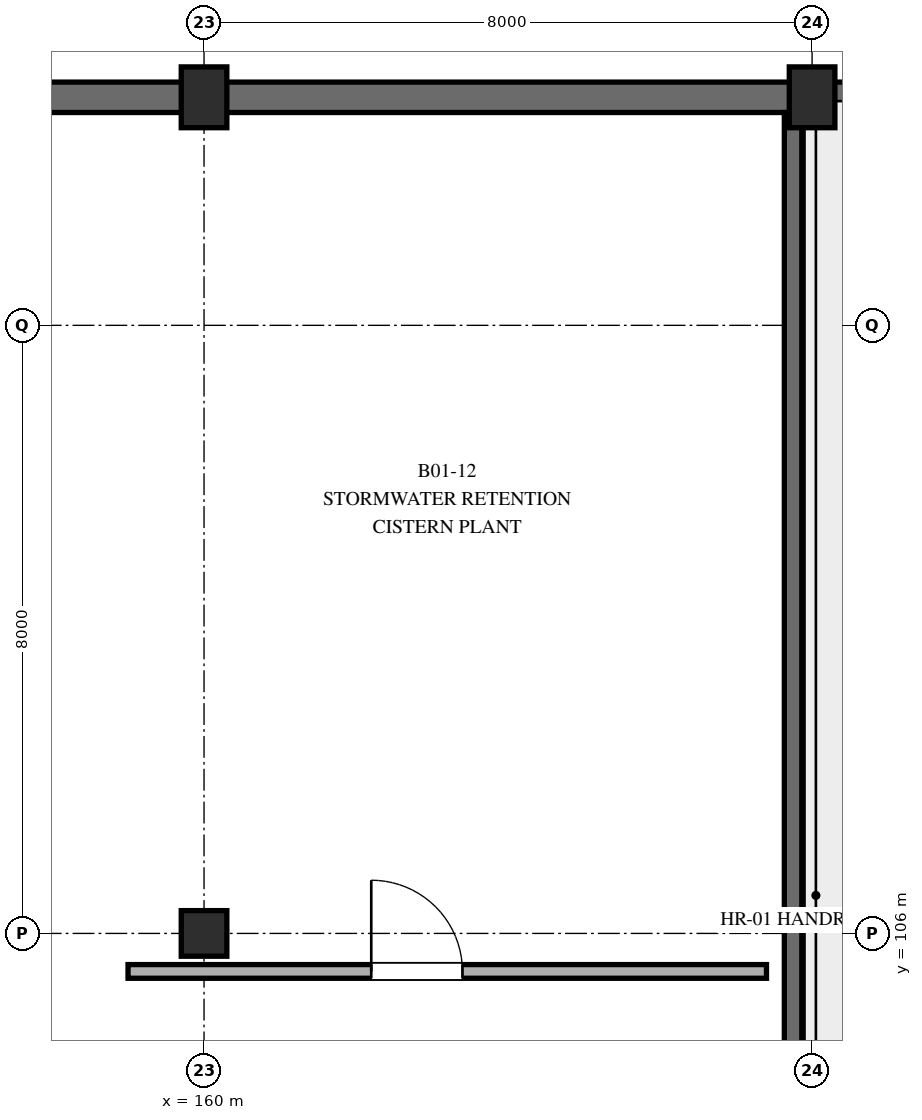
"""IFC4 building model, lengths in metres.
Left out: names, types, materials, properties, quantities, classifications, styles, units other than length and angle.
Written with IfcOpenShell. Run it as: python <this file> out.ifc"""

import sys

from ifc_helpers import new_model, si_unit, direction, frame, frame_2d, origin, origin_2d, place, context, subcontext, project, spatial, rectangle, extrude, element, fill, save


model = new_model("IFC4")
c1 = context("Model", 3, precision=1e-05, world=origin(), true_north=direction((0.0, 1.0)))
c2 = subcontext(c1, "Body", "Model", "MODEL_VIEW")
j1 = project(units=[si_unit("LENGTHUNIT", "METRE"), si_unit("PLANEANGLEUNIT", "RADIAN")], contexts=[c1])
p1 = place(None, origin())
s1 = spatial("IfcSite", under=j1, at=p1, CompositionType="ELEMENT")
p2 = place(p1, origin())
s2 = spatial("IfcBuilding", under=s1, at=p2, CompositionType="ELEMENT")
p3 = place(p2, frame((0.0, 0.0, -4.2)))
s3 = spatial("IfcBuildingStorey", under=s2, at=p3, CompositionType="ELEMENT", Elevation=-4.2)
p4 = place(p3, frame((160.0, 106.0, 0.0), z_axis=(0.0, 0.0, 1.0), x_axis=(1.0, 0.0, 0.0)))
e1 = element("IfcColumn", 1, at=p4, inside=s3, PredefinedType="COLUMN", context=c2, shape_type="SweptSolid", body=[
    extrude(rectangle(XDim=0.6, YDim=0.6, at=origin_2d()), origin(), (0.0, 0.0, 1.0), 4.2),
])
for number, where, z_axis, x_axis in (
    (2, (160.0, 117.0, 0.0), (0.0, 0.0, 1.0), (1.0, 0.0, 0.0)),
    (3, (168.0, 117.0, 0.0), (0.0, 0.0, 1.0), (1.0, 0.0, 0.0)),
):
    element("IfcColumn", number, at=place(p3, frame(where, z_axis=z_axis, x_axis=x_axis)), inside=s3, PredefinedType="COLUMN", context=c2, shape_type="SweptSolid", body=[
        extrude(rectangle(XDim=0.6, YDim=0.8, at=origin_2d()), origin(), (0.0, 0.0, 1.0), 4.2),
    ])
p5 = place(p3, frame((174.2, 117.0, 0.0), z_axis=(0.0, 0.0, 1.0), x_axis=(-1.0, 0.0, 0.0)))
e4 = element("IfcWall", 4, at=p5, inside=s3, PredefinedType="SOLIDWALL", context=c2, shape_type="SweptSolid", body=[
    extrude(rectangle(XDim=70.4, YDim=0.4, at=frame_2d((35.2, 0.0))), origin(), (0.0, 0.0, 1.0), 3.93),
])
p6 = place(p3, frame((167.75, 73.0, 0.0), z_axis=(0.0, 0.0, 1.0), x_axis=(0.0, 1.0, 0.0)))
e5 = element("IfcWall", 5, at=p6, inside=s3, PredefinedType="SHEAR", context=c2, shape_type="SweptSolid", body=[
    extrude(rectangle(XDim=43.8, YDim=0.23, at=frame_2d((21.9, 0.0))), origin(), (0.0, 0.0, 1.0), 3.95),
])
p7 = place(p3, frame((159.0, 105.5, 0.0), z_axis=(0.0, 0.0, 1.0), x_axis=(1.0, 0.0, 0.0)))
e6 = element("IfcWall", 6, at=p7, inside=s3, PredefinedType="PARTITIONING", context=c2, shape_type="SweptSolid", body=[
    extrude(rectangle(XDim=8.4, YDim=0.18, at=frame_2d((4.2, 0.0))), origin(), (0.0, 0.0, 1.0), 3.25),
])
p8 = place(p7, frame((3.2, 0.0, 0.0)))
e7 = element("IfcOpeningElement", 7, at=p8, cuts=e6, PredefinedType="OPENING", context=c2, shape_type="SweptSolid", body=[
    extrude(rectangle(XDim=1.2, YDim=2.2, at=frame_2d((0.6, 1.1))), frame((0.0, 0.1, 0.0), z_axis=(0.0, -1.0, 0.0), x_axis=(1.0, 0.0, 0.0)), (0.0, 0.0, 1.0), 0.2),
])
p9 = place(p8, origin())
e8 = element("IfcDoor", 8, at=p9, inside=s3, OperationType="SINGLE_SWING_LEFT", PredefinedType="DOOR", context=c2, shape_type="SweptSolid", body=[
    extrude(rectangle(XDim=1.2, YDim=2.2, at=frame_2d((0.6, 1.1))), frame((0.0, 0.025, 0.0), z_axis=(0.0, -1.0, 0.0), x_axis=(1.0, 0.0, 0.0)), (0.0, 0.0, 1.0), 0.05),
])
fill(e7, e8)
save(model, sys.argv[1])
